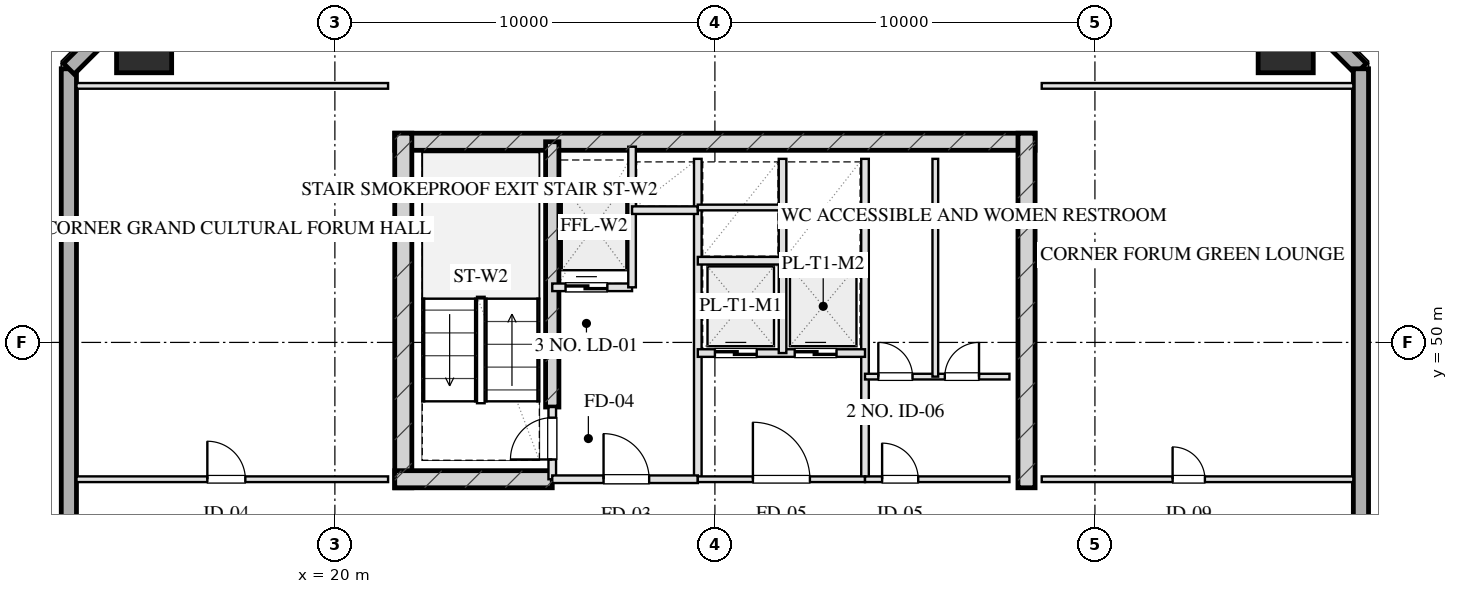
"""IFC4 building model, lengths in metres.
Left out: names, types, materials, properties, quantities, classifications, styles, units other than length and angle.
Written with IfcOpenShell. Run it as: python <this file> out.ifc"""

import sys

from ifc_helpers import new_model, si_unit, direction, frame, frame_2d, origin, origin_2d, place, context, subcontext, project, spatial, rectangle, hollow_rectangle, extrude, element, fill, save


model = new_model("IFC4")
c1 = context("Model", 3, precision=1e-05, world=origin(), true_north=direction((0.0, 1.0)))
c2 = subcontext(c1, "Body", "Model", "MODEL_VIEW")
j1 = project(units=[si_unit("LENGTHUNIT", "METRE"), si_unit("PLANEANGLEUNIT", "RADIAN")], contexts=[c1])
p1 = place(None, origin())
s1 = spatial("IfcSite", under=j1, at=p1, CompositionType="ELEMENT")
p2 = place(p1, origin())
s2 = spatial("IfcBuilding", under=s1, at=p2, CompositionType="ELEMENT")
p3 = place(p2, frame((0.0, 0.0, 205.85)))
s3 = spatial("IfcBuildingStorey", under=s2, at=p3, CompositionType="ELEMENT", Elevation=205.85)
p4 = place(p3, frame((21.575, 55.28, 0.0), z_axis=(0.0, 0.0, 1.0), x_axis=(1.0, 0.0, 0.0)))
e1 = element("IfcWall", 1, at=p4, inside=s3, PredefinedType="SHEAR", context=c2, shape_type="SweptSolid", body=[
    extrude(rectangle(XDim=16.85, YDim=0.45, at=frame_2d((8.425, 0.0))), origin(), (0.0, 0.0, 1.0), 3.45),
])
for number, where, z_axis, x_axis in (
    (2, (21.8, 46.175, 0.0), (0.0, 0.0, 1.0), (0.0, 1.0, 0.0)),
    (3, (38.2, 46.175, 0.0), (0.0, 0.0, 1.0), (0.0, 1.0, 0.0)),
):
    element("IfcWall", number, at=place(p3, frame(where, z_axis=z_axis, x_axis=x_axis)), inside=s3, PredefinedType="SHEAR", context=c2, shape_type="SweptSolid", body=[
        extrude(rectangle(XDim=9.33, YDim=0.45, at=frame_2d((4.665, 0.0))), origin(), (0.0, 0.0, 1.0), 3.45),
    ])
p5 = place(p3, frame((25.72, 48.3, 0.0), z_axis=(0.0, 0.0, 1.0), x_axis=(0.0, 1.0, 0.0)))
e4 = element("IfcWall", 4, at=p5, inside=s3, PredefinedType="SHEAR", context=c2, shape_type="SweptSolid", body=[
    extrude(rectangle(XDim=6.98, YDim=0.35, at=frame_2d((3.49, 0.0))), origin(), (0.0, 0.0, 1.0), 3.45),
])
p6 = place(p3, frame((21.575, 46.4, 0.0), z_axis=(0.0, 0.0, 1.0), x_axis=(1.0, 0.0, 0.0)))
e5 = element("IfcWall", 5, at=p6, inside=s3, PredefinedType="SHEAR", context=c2, shape_type="SweptSolid", body=[
    extrude(rectangle(XDim=4.145, YDim=0.45, at=frame_2d((2.073, 0.0))), origin(), (0.0, 0.0, 1.0), 3.45),
])
for number, where, z_axis, x_axis in (
    (6, (45.02, 57.82, 0.0), (0.0, 0.0, 1.0), (1.0, 0.0, 0.0)),
    (7, (14.98, 57.82, 0.0), (0.0, 0.0, 1.0), (1.0, 0.0, 0.0)),
):
    element("IfcColumn", number, at=place(p3, frame(where, z_axis=z_axis, x_axis=x_axis)), inside=s3, PredefinedType="COLUMN", context=c2, shape_type="SweptSolid", body=[
        extrude(hollow_rectangle(XDim=1.45, YDim=1.45, WallThickness=0.05, at=origin_2d()), origin(), (0.0, 0.0, 1.0), 3.451),
    ])
p7 = place(p3, frame((13.0, 10.8, 0.0), z_axis=(0.0, 0.0, 1.0), x_axis=(0.0, 1.0, 0.0)))
e8 = element("IfcWall", 8, at=p7, inside=s3, PredefinedType="SOLIDWALL", context=c2, shape_type="SweptSolid", body=[
    extrude(rectangle(XDim=46.4, YDim=0.4, at=frame_2d((23.2, 0.0))), origin(), (0.0, 0.0, 1.0), 2.61),
])
p8 = place(p7, frame((15.75, 0.0, 0.75)))
e9 = element("IfcOpeningElement", 9, at=p8, cuts=e8, PredefinedType="OPENING", context=c2, shape_type="SweptSolid", body=[
    extrude(rectangle(XDim=2.1, YDim=1.46, at=frame_2d((1.05, 0.73))), frame((0.0, 0.21, 0.0), z_axis=(0.0, -1.0, 0.0), x_axis=(1.0, 0.0, 0.0)), (0.0, 0.0, 1.0), 0.42),
])
p9 = place(p7, frame((19.55, 0.0, 0.75)))
e10 = element("IfcOpeningElement", 10, at=p9, cuts=e8, PredefinedType="OPENING", context=c2, shape_type="SweptSolid", body=[
    extrude(rectangle(XDim=2.1, YDim=1.46, at=frame_2d((1.05, 0.73))), frame((0.0, 0.21, 0.0), z_axis=(0.0, -1.0, 0.0), x_axis=(1.0, 0.0, 0.0)), (0.0, 0.0, 1.0), 0.42),
])
p10 = place(p7, frame((27.05, 0.0, 0.0)))
e11 = element("IfcOpeningElement", 11, at=p10, cuts=e8, PredefinedType="OPENING", context=c2, shape_type="SweptSolid", body=[
    extrude(rectangle(XDim=1.1, YDim=2.15, at=frame_2d((0.55, 1.075))), frame((0.0, 0.21, 0.0), z_axis=(0.0, -1.0, 0.0), x_axis=(1.0, 0.0, 0.0)), (0.0, 0.0, 1.0), 0.42),
])
for number, where, z_axis, x_axis in (
    (12, (13.0, 57.2, 0.0), (0.0, 0.0, 1.0), (0.707, 0.707, 0.0)),
    (13, (44.4, 59.8, 0.0), (0.0, 0.0, 1.0), (0.707, -0.707, 0.0)),
):
    element("IfcWall", number, at=place(p3, frame(where, z_axis=z_axis, x_axis=x_axis)), inside=s3, PredefinedType="SOLIDWALL", context=c2, shape_type="SweptSolid", body=[
        extrude(rectangle(XDim=3.677, YDim=0.4, at=frame_2d((1.838, 0.0))), origin(), (0.0, 0.0, 1.0), 2.61),
    ])
p11 = place(p3, frame((47.0, 57.2, 0.0), z_axis=(0.0, 0.0, 1.0), x_axis=(0.0, -1.0, 0.0)))
e14 = element("IfcWall", 14, at=p11, inside=s3, PredefinedType="SOLIDWALL", context=c2, shape_type="SweptSolid", body=[
    extrude(rectangle(XDim=46.4, YDim=0.4, at=frame_2d((23.2, 0.0))), origin(), (0.0, 0.0, 1.0), 2.61),
])
p12 = place(p11, frame((28.55, 0.0, 0.75)))
e15 = element("IfcOpeningElement", 15, at=p12, cuts=e14, PredefinedType="OPENING", context=c2, shape_type="SweptSolid", body=[
    extrude(rectangle(XDim=2.1, YDim=1.46, at=frame_2d((1.05, 0.73))), frame((0.0, 0.21, 0.0), z_axis=(0.0, -1.0, 0.0), x_axis=(1.0, 0.0, 0.0)), (0.0, 0.0, 1.0), 0.42),
])
p13 = place(p11, frame((24.75, 0.0, 0.75)))
e16 = element("IfcOpeningElement", 16, at=p13, cuts=e14, PredefinedType="OPENING", context=c2, shape_type="SweptSolid", body=[
    extrude(rectangle(XDim=2.1, YDim=1.46, at=frame_2d((1.05, 0.73))), frame((0.0, 0.21, 0.0), z_axis=(0.0, -1.0, 0.0), x_axis=(1.0, 0.0, 0.0)), (0.0, 0.0, 1.0), 0.42),
])
p14 = place(p11, frame((16.667, 0.0, 0.0)))
e17 = element("IfcOpeningElement", 17, at=p14, cuts=e14, PredefinedType="OPENING", context=c2, shape_type="SweptSolid", body=[
    extrude(rectangle(XDim=1.1, YDim=2.15, at=frame_2d((0.55, 1.075))), frame((0.0, 0.21, 0.0), z_axis=(0.0, -1.0, 0.0), x_axis=(1.0, 0.0, 0.0)), (0.0, 0.0, 1.0), 0.42),
])
p15 = place(p3, frame((25.72, 46.4, 0.0), z_axis=(0.0, 0.0, 1.0), x_axis=(0.0, 1.0, 0.0)))
e18 = element("IfcWall", 18, at=p15, inside=s3, PredefinedType="PARTITIONING", context=c2, shape_type="SweptSolid", body=[
    extrude(rectangle(XDim=1.9, YDim=0.2, at=frame_2d((0.95, 0.0))), origin(), (0.0, 0.0, 1.0), 3.175),
])
p16 = place(p15, frame((0.52, 0.0, 0.0)))
e19 = element("IfcOpeningElement", 19, at=p16, cuts=e18, PredefinedType="OPENING", context=c2, shape_type="SweptSolid", body=[
    extrude(rectangle(XDim=1.1, YDim=2.05, at=frame_2d((0.55, 1.025))), frame((0.0, 0.11, 0.0), z_axis=(0.0, -1.0, 0.0), x_axis=(1.0, 0.0, 0.0)), (0.0, 0.0, 1.0), 0.22),
])
p17 = place(p3, frame((29.55, 46.4, 0.0), z_axis=(0.0, 0.0, 1.0), x_axis=(0.0, 1.0, 0.0)))
e20 = element("IfcWall", 20, at=p17, inside=s3, PredefinedType="PARTITIONING", context=c2, shape_type="SweptSolid", body=[
    extrude(rectangle(XDim=8.43, YDim=0.2, at=frame_2d((4.215, 0.0))), origin(), (0.0, 0.0, 1.0), 3.175),
])
p18 = place(p3, frame((25.72, 46.4, 0.0), z_axis=(0.0, 0.0, 1.0), x_axis=(1.0, 0.0, 0.0)))
e21 = element("IfcWall", 21, at=p18, inside=s3, PredefinedType="PARTITIONING", context=c2, shape_type="SweptSolid", body=[
    extrude(rectangle(XDim=3.83, YDim=0.2, at=frame_2d((1.915, 0.0))), origin(), (0.0, 0.0, 1.0), 3.175),
])
p19 = place(p18, frame((1.35, 0.0, 0.0)))
e22 = element("IfcOpeningElement", 22, at=p19, cuts=e21, PredefinedType="OPENING", context=c2, shape_type="SweptSolid", body=[
    extrude(rectangle(XDim=1.2, YDim=2.05, at=frame_2d((0.6, 1.025))), frame((0.0, 0.11, 0.0), z_axis=(0.0, -1.0, 0.0), x_axis=(1.0, 0.0, 0.0)), (0.0, 0.0, 1.0), 0.22),
])
p20 = place(p3, frame((25.72, 51.45, 0.0), z_axis=(0.0, 0.0, 1.0), x_axis=(1.0, 0.0, 0.0)))
e23 = element("IfcWall", 23, at=p20, inside=s3, PredefinedType="PARTITIONING", context=c2, shape_type="SweptSolid", body=[
    extrude(rectangle(XDim=2.1, YDim=0.2, at=frame_2d((1.05, 0.0))), origin(), (0.0, 0.0, 1.0), 3.175),
])
p21 = place(p20, frame((0.35, 0.0, 0.0)))
e24 = element("IfcOpeningElement", 24, at=p21, cuts=e23, PredefinedType="OPENING", context=c2, shape_type="SweptSolid", body=[
    extrude(rectangle(XDim=1.1, YDim=2.05, at=frame_2d((0.55, 1.025))), frame((0.0, 0.11, 0.0), z_axis=(0.0, -1.0, 0.0), x_axis=(1.0, 0.0, 0.0)), (0.0, 0.0, 1.0), 0.22),
])
p22 = place(p3, frame((27.82, 51.45, 0.0), z_axis=(0.0, 0.0, 1.0), x_axis=(0.0, 1.0, 0.0)))
e25 = element("IfcWall", 25, at=p22, inside=s3, PredefinedType="PARTITIONING", context=c2, shape_type="SweptSolid", body=[
    extrude(rectangle(XDim=3.7, YDim=0.2, at=frame_2d((1.85, 0.0))), origin(), (0.0, 0.0, 1.0), 3.175),
])
p23 = place(p3, frame((27.82, 53.48, 0.0), z_axis=(0.0, 0.0, 1.0), x_axis=(1.0, 0.0, 0.0)))
e26 = element("IfcWall", 26, at=p23, inside=s3, PredefinedType="PARTITIONING", context=c2, shape_type="SweptSolid", body=[
    extrude(rectangle(XDim=1.73, YDim=0.2, at=frame_2d((0.865, 0.0))), origin(), (0.0, 0.0, 1.0), 3.175),
])
p24 = place(p3, frame((33.95, 46.4, 0.0), z_axis=(0.0, 0.0, 1.0), x_axis=(0.0, 1.0, 0.0)))
e27 = element("IfcWall", 27, at=p24, inside=s3, PredefinedType="PARTITIONING", context=c2, shape_type="SweptSolid", body=[
    extrude(rectangle(XDim=8.43, YDim=0.2, at=frame_2d((4.215, 0.0))), origin(), (0.0, 0.0, 1.0), 3.175),
])
p25 = place(p3, frame((29.55, 46.4, 0.0), z_axis=(0.0, 0.0, 1.0), x_axis=(1.0, 0.0, 0.0)))
e28 = element("IfcWall", 28, at=p25, inside=s3, PredefinedType="PARTITIONING", context=c2, shape_type="SweptSolid", body=[
    extrude(rectangle(XDim=4.4, YDim=0.15, at=frame_2d((2.2, 0.0))), origin(), (0.0, 0.0, 1.0), 3.175),
])
p26 = place(p25, frame((1.45, 0.0, 0.0)))
e29 = element("IfcOpeningElement", 29, at=p26, cuts=e28, PredefinedType="OPENING", context=c2, shape_type="SweptSolid", body=[
    extrude(rectangle(XDim=1.5, YDim=2.05, at=frame_2d((0.75, 1.025))), frame((0.0, 0.085, 0.0), z_axis=(0.0, -1.0, 0.0), x_axis=(1.0, 0.0, 0.0)), (0.0, 0.0, 1.0), 0.17),
])
p27 = place(p3, frame((29.55, 49.72, 0.0), z_axis=(0.0, 0.0, 1.0), x_axis=(1.0, 0.0, 0.0)))
e30 = element("IfcWall", 30, at=p27, inside=s3, PredefinedType="PARTITIONING", context=c2, shape_type="SweptSolid", body=[
    extrude(rectangle(XDim=4.4, YDim=0.2, at=frame_2d((2.2, 0.0))), origin(), (0.0, 0.0, 1.0), 3.175),
])
p28 = place(p27, frame((0.45, 0.0, 0.0)))
e31 = element("IfcOpeningElement", 31, at=p28, cuts=e30, PredefinedType="OPENING", context=c2, shape_type="SweptSolid", body=[
    extrude(rectangle(XDim=1.1, YDim=2.05, at=frame_2d((0.55, 1.025))), frame((0.0, 0.11, 0.0), z_axis=(0.0, -1.0, 0.0), x_axis=(1.0, 0.0, 0.0)), (0.0, 0.0, 1.0), 0.22),
])
p29 = place(p27, frame((2.55, 0.0, 0.0)))
e32 = element("IfcOpeningElement", 32, at=p29, cuts=e30, PredefinedType="OPENING", context=c2, shape_type="SweptSolid", body=[
    extrude(rectangle(XDim=1.1, YDim=2.05, at=frame_2d((0.55, 1.025))), frame((0.0, 0.11, 0.0), z_axis=(0.0, -1.0, 0.0), x_axis=(1.0, 0.0, 0.0)), (0.0, 0.0, 1.0), 0.22),
])
p30 = place(p3, frame((31.78, 49.72, 0.0), z_axis=(0.0, 0.0, 1.0), x_axis=(0.0, 1.0, 0.0)))
e33 = element("IfcWall", 33, at=p30, inside=s3, PredefinedType="PARTITIONING", context=c2, shape_type="SweptSolid", body=[
    extrude(rectangle(XDim=5.11, YDim=0.2, at=frame_2d((2.555, 0.0))), origin(), (0.0, 0.0, 1.0), 3.175),
])
p31 = place(p3, frame((29.55, 52.15, 0.0), z_axis=(0.0, 0.0, 1.0), x_axis=(1.0, 0.0, 0.0)))
e34 = element("IfcWall", 34, at=p31, inside=s3, PredefinedType="PARTITIONING", context=c2, shape_type="SweptSolid", body=[
    extrude(rectangle(XDim=4.4, YDim=0.2, at=frame_2d((2.2, 0.0))), origin(), (0.0, 0.0, 1.0), 3.175),
])
p32 = place(p3, frame((29.55, 53.55, 0.0), z_axis=(0.0, 0.0, 1.0), x_axis=(1.0, 0.0, 0.0)))
e35 = element("IfcWall", 35, at=p32, inside=s3, PredefinedType="PARTITIONING", context=c2, shape_type="SweptSolid", body=[
    extrude(rectangle(XDim=2.23, YDim=0.15, at=frame_2d((1.115, 0.0))), origin(), (0.0, 0.0, 1.0), 3.175),
])
p33 = place(p3, frame((33.95, 46.4, 0.0), z_axis=(0.0, 0.0, 1.0), x_axis=(1.0, 0.0, 0.0)))
e36 = element("IfcWall", 36, at=p33, inside=s3, PredefinedType="PARTITIONING", context=c2, shape_type="SweptSolid", body=[
    extrude(rectangle(XDim=3.8, YDim=0.15, at=frame_2d((1.9, 0.0))), origin(), (0.0, 0.0, 1.0), 3.175),
])
p34 = place(p33, frame((0.45, 0.0, 0.0)))
e37 = element("IfcOpeningElement", 37, at=p34, cuts=e36, PredefinedType="OPENING", context=c2, shape_type="SweptSolid", body=[
    extrude(rectangle(XDim=0.95, YDim=2.05, at=frame_2d((0.475, 1.025))), frame((0.0, 0.085, 0.0), z_axis=(0.0, -1.0, 0.0), x_axis=(1.0, 0.0, 0.0)), (0.0, 0.0, 1.0), 0.17),
])
p35 = place(p3, frame((33.95, 49.1, 0.0), z_axis=(0.0, 0.0, 1.0), x_axis=(1.0, 0.0, 0.0)))
e38 = element("IfcWall", 38, at=p35, inside=s3, PredefinedType="PARTITIONING", context=c2, shape_type="SweptSolid", body=[
    extrude(rectangle(XDim=3.8, YDim=0.15, at=frame_2d((1.9, 0.0))), origin(), (0.0, 0.0, 1.0), 3.175),
])
p36 = place(p35, frame((0.35, 0.0, 0.0)))
e39 = element("IfcOpeningElement", 39, at=p36, cuts=e38, PredefinedType="OPENING", context=c2, shape_type="SweptSolid", body=[
    extrude(rectangle(XDim=0.9, YDim=2.05, at=frame_2d((0.45, 1.025))), frame((0.0, 0.085, 0.0), z_axis=(0.0, -1.0, 0.0), x_axis=(1.0, 0.0, 0.0)), (0.0, 0.0, 1.0), 0.17),
])
p37 = place(p35, frame((2.1, 0.0, 0.0)))
e40 = element("IfcOpeningElement", 40, at=p37, cuts=e38, PredefinedType="OPENING", context=c2, shape_type="SweptSolid", body=[
    extrude(rectangle(XDim=0.9, YDim=2.05, at=frame_2d((0.45, 1.025))), frame((0.0, 0.085, 0.0), z_axis=(0.0, -1.0, 0.0), x_axis=(1.0, 0.0, 0.0)), (0.0, 0.0, 1.0), 0.17),
])
p38 = place(p3, frame((35.8, 49.1, 0.0), z_axis=(0.0, 0.0, 1.0), x_axis=(0.0, 1.0, 0.0)))
e41 = element("IfcWall", 41, at=p38, inside=s3, PredefinedType="PARTITIONING", context=c2, shape_type="SweptSolid", body=[
    extrude(rectangle(XDim=5.73, YDim=0.15, at=frame_2d((2.865, 0.0))), origin(), (0.0, 0.0, 1.0), 3.175),
])
p39 = place(p3, frame((13.2, 56.75, 0.0), z_axis=(0.0, 0.0, 1.0), x_axis=(1.0, 0.0, 0.0)))
e42 = element("IfcWall", 42, at=p39, inside=s3, PredefinedType="PARTITIONING", context=c2, shape_type="SweptSolid", body=[
    extrude(rectangle(XDim=8.2, YDim=0.15, at=frame_2d((4.1, 0.0))), origin(), (0.0, 0.0, 1.0), 3.175),
])
p40 = place(p3, frame((13.2, 46.4, 0.0), z_axis=(0.0, 0.0, 1.0), x_axis=(1.0, 0.0, 0.0)))
e43 = element("IfcWall", 43, at=p40, inside=s3, PredefinedType="PARTITIONING", context=c2, shape_type="SweptSolid", body=[
    extrude(rectangle(XDim=8.2, YDim=0.15, at=frame_2d((4.1, 0.0))), origin(), (0.0, 0.0, 1.0), 3.175),
])
p41 = place(p40, frame((3.444, 0.0, 0.0)))
e44 = element("IfcOpeningElement", 44, at=p41, cuts=e43, PredefinedType="OPENING", context=c2, shape_type="SweptSolid", body=[
    extrude(rectangle(XDim=1.0, YDim=2.05, at=frame_2d((0.5, 1.025))), frame((0.0, 0.085, 0.0), z_axis=(0.0, -1.0, 0.0), x_axis=(1.0, 0.0, 0.0)), (0.0, 0.0, 1.0), 0.17),
])
p42 = place(p3, frame((38.6, 56.75, 0.0), z_axis=(0.0, 0.0, 1.0), x_axis=(1.0, 0.0, 0.0)))
e45 = element("IfcWall", 45, at=p42, inside=s3, PredefinedType="PARTITIONING", context=c2, shape_type="SweptSolid", body=[
    extrude(rectangle(XDim=8.2, YDim=0.15, at=frame_2d((4.1, 0.0))), origin(), (0.0, 0.0, 1.0), 3.175),
])
p43 = place(p3, frame((38.6, 46.4, 0.0), z_axis=(0.0, 0.0, 1.0), x_axis=(1.0, 0.0, 0.0)))
e46 = element("IfcWall", 46, at=p43, inside=s3, PredefinedType="PARTITIONING", context=c2, shape_type="SweptSolid", body=[
    extrude(rectangle(XDim=8.2, YDim=0.15, at=frame_2d((4.1, 0.0))), origin(), (0.0, 0.0, 1.0), 3.175),
])
p44 = place(p43, frame((3.444, 0.0, 0.0)))
e47 = element("IfcOpeningElement", 47, at=p44, cuts=e46, PredefinedType="OPENING", context=c2, shape_type="SweptSolid", body=[
    extrude(rectangle(XDim=0.85, YDim=2.05, at=frame_2d((0.425, 1.025))), frame((0.0, 0.085, 0.0), z_axis=(0.0, -1.0, 0.0), x_axis=(1.0, 0.0, 0.0)), (0.0, 0.0, 1.0), 0.17),
])
p45 = place(p16, origin())
e48 = element("IfcDoor", 48, at=p45, inside=s3, OperationType="SINGLE_SWING_LEFT", PredefinedType="DOOR", context=c2, shape_type="SweptSolid", body=[
    extrude(rectangle(XDim=1.1, YDim=2.05, at=frame_2d((0.55, 1.025))), frame((0.0, 0.025, 0.0), z_axis=(0.0, -1.0, 0.0), x_axis=(1.0, 0.0, 0.0)), (0.0, 0.0, 1.0), 0.05),
])
fill(e19, e48)
p46 = place(p19, origin())
e49 = element("IfcDoor", 49, at=p46, inside=s3, OperationType="SINGLE_SWING_LEFT", PredefinedType="DOOR", context=c2, shape_type="SweptSolid", body=[
    extrude(rectangle(XDim=1.2, YDim=2.05, at=frame_2d((0.6, 1.025))), frame((0.0, 0.025, 0.0), z_axis=(0.0, -1.0, 0.0), x_axis=(1.0, 0.0, 0.0)), (0.0, 0.0, 1.0), 0.05),
])
fill(e22, e49)
p47 = place(p21, origin())
e50 = element("IfcDoor", 50, at=p47, inside=s3, OperationType="DOUBLE_DOOR_SLIDING", PredefinedType="DOOR", context=c2, shape_type="SweptSolid", body=[
    extrude(rectangle(XDim=1.1, YDim=2.05, at=frame_2d((0.55, 1.025))), frame((0.0, 0.025, 0.0), z_axis=(0.0, -1.0, 0.0), x_axis=(1.0, 0.0, 0.0)), (0.0, 0.0, 1.0), 0.05),
])
fill(e24, e50)
p48 = place(p26, origin())
e51 = element("IfcDoor", 51, at=p48, inside=s3, OperationType="SINGLE_SWING_LEFT", PredefinedType="DOOR", context=c2, shape_type="SweptSolid", body=[
    extrude(rectangle(XDim=1.5, YDim=2.05, at=frame_2d((0.75, 1.025))), frame((0.0, 0.025, 0.0), z_axis=(0.0, -1.0, 0.0), x_axis=(1.0, 0.0, 0.0)), (0.0, 0.0, 1.0), 0.05),
])
fill(e29, e51)
p49 = place(p28, origin())
e52 = element("IfcDoor", 52, at=p49, inside=s3, OperationType="DOUBLE_DOOR_SLIDING", PredefinedType="DOOR", context=c2, shape_type="SweptSolid", body=[
    extrude(rectangle(XDim=1.1, YDim=2.05, at=frame_2d((0.55, 1.025))), frame((0.0, 0.025, 0.0), z_axis=(0.0, -1.0, 0.0), x_axis=(1.0, 0.0, 0.0)), (0.0, 0.0, 1.0), 0.05),
])
fill(e31, e52)
p50 = place(p29, origin())
e53 = element("IfcDoor", 53, at=p50, inside=s3, OperationType="DOUBLE_DOOR_SLIDING", PredefinedType="DOOR", context=c2, shape_type="SweptSolid", body=[
    extrude(rectangle(XDim=1.1, YDim=2.05, at=frame_2d((0.55, 1.025))), frame((0.0, 0.025, 0.0), z_axis=(0.0, -1.0, 0.0), x_axis=(1.0, 0.0, 0.0)), (0.0, 0.0, 1.0), 0.05),
])
fill(e32, e53)
p51 = place(p34, origin())
e54 = element("IfcDoor", 54, at=p51, inside=s3, OperationType="SINGLE_SWING_LEFT", PredefinedType="DOOR", context=c2, shape_type="SweptSolid", body=[
    extrude(rectangle(XDim=0.95, YDim=2.05, at=frame_2d((0.475, 1.025))), frame((0.0, 0.025, 0.0), z_axis=(0.0, -1.0, 0.0), x_axis=(1.0, 0.0, 0.0)), (0.0, 0.0, 1.0), 0.05),
])
fill(e37, e54)
p52 = place(p36, origin())
e55 = element("IfcDoor", 55, at=p52, inside=s3, OperationType="SINGLE_SWING_LEFT", PredefinedType="DOOR", context=c2, shape_type="SweptSolid", body=[
    extrude(rectangle(XDim=0.9, YDim=2.05, at=frame_2d((0.45, 1.025))), frame((0.0, 0.025, 0.0), z_axis=(0.0, -1.0, 0.0), x_axis=(1.0, 0.0, 0.0)), (0.0, 0.0, 1.0), 0.05),
])
fill(e39, e55)
p53 = place(p37, origin())
e56 = element("IfcDoor", 56, at=p53, inside=s3, OperationType="SINGLE_SWING_RIGHT", PredefinedType="DOOR", context=c2, shape_type="SweptSolid", body=[
    extrude(rectangle(XDim=0.9, YDim=2.05, at=frame_2d((0.45, 1.025))), frame((0.0, 0.025, 0.0), z_axis=(0.0, -1.0, 0.0), x_axis=(1.0, 0.0, 0.0)), (0.0, 0.0, 1.0), 0.05),
])
fill(e40, e56)
p54 = place(p41, origin())
e57 = element("IfcDoor", 57, at=p54, inside=s3, OperationType="SINGLE_SWING_LEFT", PredefinedType="DOOR", context=c2, shape_type="SweptSolid", body=[
    extrude(rectangle(XDim=1.0, YDim=2.05, at=frame_2d((0.5, 1.025))), frame((0.0, 0.025, 0.0), z_axis=(0.0, -1.0, 0.0), x_axis=(1.0, 0.0, 0.0)), (0.0, 0.0, 1.0), 0.05),
])
fill(e44, e57)
p55 = place(p44, origin())
e58 = element("IfcDoor", 58, at=p55, inside=s3, OperationType="SINGLE_SWING_LEFT", PredefinedType="DOOR", context=c2, shape_type="SweptSolid", body=[
    extrude(rectangle(XDim=0.85, YDim=2.05, at=frame_2d((0.425, 1.025))), frame((0.0, 0.025, 0.0), z_axis=(0.0, -1.0, 0.0), x_axis=(1.0, 0.0, 0.0)), (0.0, 0.0, 1.0), 0.05),
])
fill(e47, e58)
save(model, sys.argv[1])
